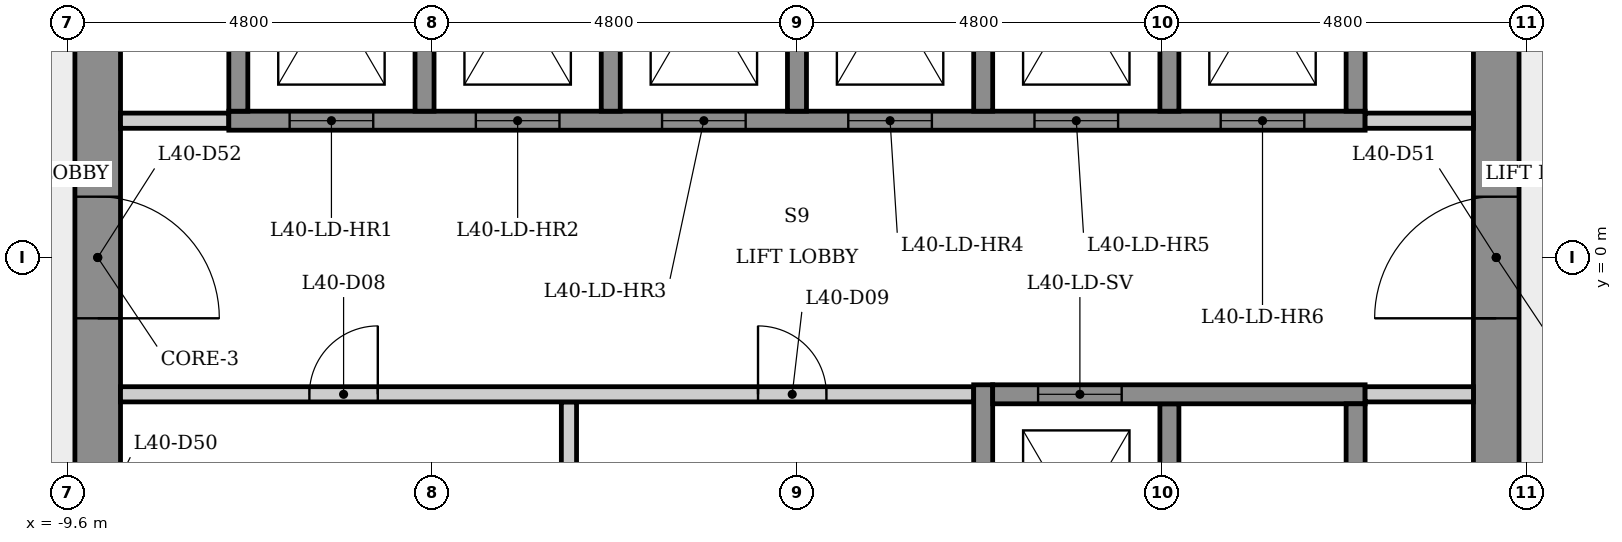
"""IFC4 building model, lengths in metres.
Left out: names, types, materials, properties, quantities, classifications, styles, units other than length and angle.
Written with IfcOpenShell. Run it as: python <this file> out.ifc"""

import sys

from ifc_helpers import new_model, si_unit, direction, frame, frame_2d, origin, place, context, subcontext, project, spatial, rectangle, extrude, element, fill, save


model = new_model("IFC4")
c1 = context("Model", 3, precision=1e-05, world=origin(), true_north=direction((0.0, 1.0)))
c2 = subcontext(c1, "Body", "Model", "MODEL_VIEW")
j1 = project(units=[si_unit("LENGTHUNIT", "METRE"), si_unit("PLANEANGLEUNIT", "RADIAN")], contexts=[c1])
p1 = place(None, origin())
s1 = spatial("IfcSite", under=j1, at=p1, CompositionType="ELEMENT")
p2 = place(p1, origin())
s2 = spatial("IfcBuilding", under=s1, at=p2, CompositionType="ELEMENT")
p3 = place(p2, frame((0.0, 0.0, 152.7)))
s3 = spatial("IfcBuildingStorey", under=s2, at=p3, CompositionType="ELEMENT", Elevation=152.7)
p4 = place(p3, frame((9.2, -5.485, 0.0), z_axis=(0.0, 0.0, 1.0), x_axis=(0.0, 1.0, 0.0)))
e1 = element("IfcWall", 1, at=p4, inside=s3, PredefinedType="SHEAR", context=c2, shape_type="SweptSolid", body=[
    extrude(rectangle(XDim=10.97, YDim=0.6, at=frame_2d((5.485, 0.0))), origin(), (0.0, 0.0, 1.0), 3.4),
])
p5 = place(p4, frame((4.685, 0.0, 0.0)))
e2 = element("IfcOpeningElement", 2, at=p5, cuts=e1, PredefinedType="OPENING", context=c2, shape_type="SweptSolid", body=[
    extrude(rectangle(XDim=1.6, YDim=2.1, at=frame_2d((0.8, 1.05))), frame((0.0, 0.31, 0.0), z_axis=(0.0, -1.0, 0.0), x_axis=(1.0, 0.0, 0.0)), (0.0, 0.0, 1.0), 0.62),
])
p6 = place(p3, frame((-9.2, 5.485, 0.0), z_axis=(0.0, 0.0, 1.0), x_axis=(0.0, -1.0, 0.0)))
e3 = element("IfcWall", 3, at=p6, inside=s3, PredefinedType="SHEAR", context=c2, shape_type="SweptSolid", body=[
    extrude(rectangle(XDim=10.97, YDim=0.6, at=frame_2d((5.485, 0.0))), origin(), (0.0, 0.0, 1.0), 3.4),
])
p7 = place(p6, frame((8.516, 0.0, 0.0)))
e4 = element("IfcOpeningElement", 4, at=p7, cuts=e3, PredefinedType="OPENING", context=c2, shape_type="SweptSolid", body=[
    extrude(rectangle(XDim=0.9, YDim=2.1, at=frame_2d((0.45, 1.05))), frame((0.0, 0.31, 0.0), z_axis=(0.0, -1.0, 0.0), x_axis=(1.0, 0.0, 0.0)), (0.0, 0.0, 1.0), 0.62),
])
p8 = place(p6, frame((4.685, 0.0, 0.0)))
e5 = element("IfcOpeningElement", 5, at=p8, cuts=e3, PredefinedType="OPENING", context=c2, shape_type="SweptSolid", body=[
    extrude(rectangle(XDim=1.6, YDim=2.1, at=frame_2d((0.8, 1.05))), frame((0.0, 0.31, 0.0), z_axis=(0.0, -1.0, 0.0), x_axis=(1.0, 0.0, 0.0)), (0.0, 0.0, 1.0), 0.62),
])
p9 = place(p3, frame((-8.9, 1.8, 0.0), z_axis=(0.0, 0.0, 1.0), x_axis=(1.0, 0.0, 0.0)))
e6 = element("IfcWall", 6, at=p9, inside=s3, PredefinedType="PARTITIONING", context=c2, shape_type="SweptSolid", body=[
    extrude(rectangle(XDim=1.425, YDim=0.2, at=frame_2d((0.712, 0.0))), origin(), (0.0, 0.0, 1.0), 3.05),
])
p10 = place(p3, frame((-7.475, 1.8, 0.0), z_axis=(0.0, 0.0, 1.0), x_axis=(1.0, 0.0, 0.0)))
e7 = element("IfcWall", 7, at=p10, inside=s3, PredefinedType="SHEAR", context=c2, shape_type="SweptSolid", body=[
    extrude(rectangle(XDim=14.95, YDim=0.25, at=frame_2d((7.475, 0.0))), origin(), (0.0, 0.0, 1.0), 3.05),
])
p11 = place(p10, frame((0.8, 0.0, 0.0)))
e8 = element("IfcOpeningElement", 8, at=p11, cuts=e7, PredefinedType="OPENING", context=c2, shape_type="SweptSolid", body=[
    extrude(rectangle(XDim=1.1, YDim=2.1, at=frame_2d((0.55, 1.05))), frame((0.0, 0.135, 0.0), z_axis=(0.0, -1.0, 0.0), x_axis=(1.0, 0.0, 0.0)), (0.0, 0.0, 1.0), 0.27),
])
p12 = place(p10, frame((3.25, 0.0, 0.0)))
e9 = element("IfcOpeningElement", 9, at=p12, cuts=e7, PredefinedType="OPENING", context=c2, shape_type="SweptSolid", body=[
    extrude(rectangle(XDim=1.1, YDim=2.1, at=frame_2d((0.55, 1.05))), frame((0.0, 0.135, 0.0), z_axis=(0.0, -1.0, 0.0), x_axis=(1.0, 0.0, 0.0)), (0.0, 0.0, 1.0), 0.27),
])
p13 = place(p10, frame((5.7, 0.0, 0.0)))
e10 = element("IfcOpeningElement", 10, at=p13, cuts=e7, PredefinedType="OPENING", context=c2, shape_type="SweptSolid", body=[
    extrude(rectangle(XDim=1.1, YDim=2.1, at=frame_2d((0.55, 1.05))), frame((0.0, 0.135, 0.0), z_axis=(0.0, -1.0, 0.0), x_axis=(1.0, 0.0, 0.0)), (0.0, 0.0, 1.0), 0.27),
])
p14 = place(p10, frame((8.15, 0.0, 0.0)))
e11 = element("IfcOpeningElement", 11, at=p14, cuts=e7, PredefinedType="OPENING", context=c2, shape_type="SweptSolid", body=[
    extrude(rectangle(XDim=1.1, YDim=2.1, at=frame_2d((0.55, 1.05))), frame((0.0, 0.135, 0.0), z_axis=(0.0, -1.0, 0.0), x_axis=(1.0, 0.0, 0.0)), (0.0, 0.0, 1.0), 0.27),
])
p15 = place(p10, frame((10.6, 0.0, 0.0)))
e12 = element("IfcOpeningElement", 12, at=p15, cuts=e7, PredefinedType="OPENING", context=c2, shape_type="SweptSolid", body=[
    extrude(rectangle(XDim=1.1, YDim=2.1, at=frame_2d((0.55, 1.05))), frame((0.0, 0.135, 0.0), z_axis=(0.0, -1.0, 0.0), x_axis=(1.0, 0.0, 0.0)), (0.0, 0.0, 1.0), 0.27),
])
p16 = place(p10, frame((13.05, 0.0, 0.0)))
e13 = element("IfcOpeningElement", 13, at=p16, cuts=e7, PredefinedType="OPENING", context=c2, shape_type="SweptSolid", body=[
    extrude(rectangle(XDim=1.1, YDim=2.1, at=frame_2d((0.55, 1.05))), frame((0.0, 0.135, 0.0), z_axis=(0.0, -1.0, 0.0), x_axis=(1.0, 0.0, 0.0)), (0.0, 0.0, 1.0), 0.27),
])
p17 = place(p3, frame((-7.35, 1.925, 0.0), z_axis=(0.0, 0.0, 1.0), x_axis=(0.0, 1.0, 0.0)))
e14 = element("IfcWall", 14, at=p17, inside=s3, PredefinedType="SHEAR", context=c2, shape_type="SweptSolid", body=[
    extrude(rectangle(XDim=4.036, YDim=0.25, at=frame_2d((2.018, 0.0))), origin(), (0.0, 0.0, 1.0), 3.05),
])
p18 = place(p3, frame((-4.9, 5.025, 0.0), z_axis=(0.0, 0.0, 1.0), x_axis=(0.0, -1.0, 0.0)))
e15 = element("IfcWall", 15, at=p18, inside=s3, PredefinedType="SHEAR", context=c2, shape_type="SweptSolid", body=[
    extrude(rectangle(XDim=3.1, YDim=0.25, at=frame_2d((1.55, 0.0))), origin(), (0.0, 0.0, 1.0), 3.4),
])
p19 = place(p3, frame((-3.0, -1.9, 0.0), z_axis=(0.0, 0.0, 1.0), x_axis=(0.0, -1.0, 0.0)))
e16 = element("IfcWall", 16, at=p19, inside=s3, PredefinedType="PARTITIONING", context=c2, shape_type="SweptSolid", body=[
    extrude(rectangle(XDim=3.15, YDim=0.2, at=frame_2d((1.575, 0.0))), origin(), (0.0, 0.0, 1.0), 3.05),
])
p20 = place(p3, frame((-8.9, -1.8, 0.0), z_axis=(0.0, 0.0, 1.0), x_axis=(1.0, 0.0, 0.0)))
e17 = element("IfcWall", 17, at=p20, inside=s3, PredefinedType="PARTITIONING", context=c2, shape_type="SweptSolid", body=[
    extrude(rectangle(XDim=11.225, YDim=0.2, at=frame_2d((5.613, 0.0))), origin(), (0.0, 0.0, 1.0), 3.05),
])
p21 = place(p20, frame((2.485, 0.0, 0.0)))
e18 = element("IfcOpeningElement", 18, at=p21, cuts=e17, PredefinedType="OPENING", context=c2, shape_type="SweptSolid", body=[
    extrude(rectangle(XDim=0.9, YDim=2.1, at=frame_2d((0.45, 1.05))), frame((0.0, 0.11, 0.0), z_axis=(0.0, -1.0, 0.0), x_axis=(1.0, 0.0, 0.0)), (0.0, 0.0, 1.0), 0.22),
])
p22 = place(p20, frame((8.387, 0.0, 0.0)))
e19 = element("IfcOpeningElement", 19, at=p22, cuts=e17, PredefinedType="OPENING", context=c2, shape_type="SweptSolid", body=[
    extrude(rectangle(XDim=0.9, YDim=2.1, at=frame_2d((0.45, 1.05))), frame((0.0, 0.11, 0.0), z_axis=(0.0, -1.0, 0.0), x_axis=(1.0, 0.0, 0.0)), (0.0, 0.0, 1.0), 0.22),
])
for number, where, z_axis, x_axis in (
    (20, (-2.45, 5.025, 0.0), (0.0, 0.0, 1.0), (0.0, -1.0, 0.0)),
    (21, (0.0, 5.025, 0.0), (0.0, 0.0, 1.0), (0.0, -1.0, 0.0)),
):
    element("IfcWall", number, at=place(p3, frame(where, z_axis=z_axis, x_axis=x_axis)), inside=s3, PredefinedType="SHEAR", context=c2, shape_type="SweptSolid", body=[
        extrude(rectangle(XDim=3.1, YDim=0.25, at=frame_2d((1.55, 0.0))), origin(), (0.0, 0.0, 1.0), 3.4),
    ])
p23 = place(p3, frame((2.45, -5.275, 0.0), z_axis=(0.0, 0.0, 1.0), x_axis=(0.0, 1.0, 0.0)))
e22 = element("IfcWall", 22, at=p23, inside=s3, PredefinedType="SHEAR", context=c2, shape_type="SweptSolid", body=[
    extrude(rectangle(XDim=3.6, YDim=0.25, at=frame_2d((1.8, 0.0))), origin(), (0.0, 0.0, 1.0), 3.05),
])
for number, where, z_axis, x_axis in (
    (23, (2.45, 5.025, 0.0), (0.0, 0.0, 1.0), (0.0, -1.0, 0.0)),
    (24, (4.9, -1.925, 0.0), (0.0, 0.0, 1.0), (0.0, -1.0, 0.0)),
    (25, (4.9, 5.025, 0.0), (0.0, 0.0, 1.0), (0.0, -1.0, 0.0)),
):
    element("IfcWall", number, at=place(p3, frame(where, z_axis=z_axis, x_axis=x_axis)), inside=s3, PredefinedType="SHEAR", context=c2, shape_type="SweptSolid", body=[
        extrude(rectangle(XDim=3.1, YDim=0.25, at=frame_2d((1.55, 0.0))), origin(), (0.0, 0.0, 1.0), 3.4),
    ])
p24 = place(p3, frame((2.575, -1.8, 0.0), z_axis=(0.0, 0.0, 1.0), x_axis=(1.0, 0.0, 0.0)))
e26 = element("IfcWall", 26, at=p24, inside=s3, PredefinedType="SHEAR", context=c2, shape_type="SweptSolid", body=[
    extrude(rectangle(XDim=4.9, YDim=0.25, at=frame_2d((2.45, 0.0))), origin(), (0.0, 0.0, 1.0), 3.05),
])
p25 = place(p24, frame((0.597, 0.0, 0.0)))
e27 = element("IfcOpeningElement", 27, at=p25, cuts=e26, PredefinedType="OPENING", context=c2, shape_type="SweptSolid", body=[
    extrude(rectangle(XDim=1.1, YDim=2.1, at=frame_2d((0.55, 1.05))), frame((0.0, 0.135, 0.0), z_axis=(0.0, -1.0, 0.0), x_axis=(1.0, 0.0, 0.0)), (0.0, 0.0, 1.0), 0.27),
])
p26 = place(p3, frame((7.475, 1.8, 0.0), z_axis=(0.0, 0.0, 1.0), x_axis=(1.0, 0.0, 0.0)))
e28 = element("IfcWall", 28, at=p26, inside=s3, PredefinedType="PARTITIONING", context=c2, shape_type="SweptSolid", body=[
    extrude(rectangle(XDim=1.425, YDim=0.2, at=frame_2d((0.712, 0.0))), origin(), (0.0, 0.0, 1.0), 3.05),
])
for number, where, z_axis, x_axis in (
    (29, (7.35, -1.925, 0.0), (0.0, 0.0, 1.0), (0.0, -1.0, 0.0)),
    (30, (7.35, 5.025, 0.0), (0.0, 0.0, 1.0), (0.0, -1.0, 0.0)),
):
    element("IfcWall", number, at=place(p3, frame(where, z_axis=z_axis, x_axis=x_axis)), inside=s3, PredefinedType="SHEAR", context=c2, shape_type="SweptSolid", body=[
        extrude(rectangle(XDim=3.1, YDim=0.25, at=frame_2d((1.55, 0.0))), origin(), (0.0, 0.0, 1.0), 3.4),
    ])
p27 = place(p3, frame((8.9, -1.8, 0.0), z_axis=(0.0, 0.0, 1.0), x_axis=(-1.0, 0.0, 0.0)))
e31 = element("IfcWall", 31, at=p27, inside=s3, PredefinedType="PARTITIONING", context=c2, shape_type="SweptSolid", body=[
    extrude(rectangle(XDim=1.425, YDim=0.2, at=frame_2d((0.712, 0.0))), origin(), (0.0, 0.0, 1.0), 3.05),
])
p28 = place(p11, origin())
e32 = element("IfcDoor", 32, at=p28, inside=s3, OperationType="SLIDING_TO_LEFT", PredefinedType="DOOR", context=c2, shape_type="SweptSolid", body=[
    extrude(rectangle(XDim=1.1, YDim=2.1, at=frame_2d((0.55, 1.05))), frame((0.0, 0.025, 0.0), z_axis=(0.0, -1.0, 0.0), x_axis=(1.0, 0.0, 0.0)), (0.0, 0.0, 1.0), 0.05),
])
fill(e8, e32)
p29 = place(p12, origin())
e33 = element("IfcDoor", 33, at=p29, inside=s3, OperationType="SLIDING_TO_LEFT", PredefinedType="DOOR", context=c2, shape_type="SweptSolid", body=[
    extrude(rectangle(XDim=1.1, YDim=2.1, at=frame_2d((0.55, 1.05))), frame((0.0, 0.025, 0.0), z_axis=(0.0, -1.0, 0.0), x_axis=(1.0, 0.0, 0.0)), (0.0, 0.0, 1.0), 0.05),
])
fill(e9, e33)
p30 = place(p13, origin())
e34 = element("IfcDoor", 34, at=p30, inside=s3, OperationType="SLIDING_TO_LEFT", PredefinedType="DOOR", context=c2, shape_type="SweptSolid", body=[
    extrude(rectangle(XDim=1.1, YDim=2.1, at=frame_2d((0.55, 1.05))), frame((0.0, 0.025, 0.0), z_axis=(0.0, -1.0, 0.0), x_axis=(1.0, 0.0, 0.0)), (0.0, 0.0, 1.0), 0.05),
])
fill(e10, e34)
p31 = place(p14, origin())
e35 = element("IfcDoor", 35, at=p31, inside=s3, OperationType="SLIDING_TO_LEFT", PredefinedType="DOOR", context=c2, shape_type="SweptSolid", body=[
    extrude(rectangle(XDim=1.1, YDim=2.1, at=frame_2d((0.55, 1.05))), frame((0.0, 0.025, 0.0), z_axis=(0.0, -1.0, 0.0), x_axis=(1.0, 0.0, 0.0)), (0.0, 0.0, 1.0), 0.05),
])
fill(e11, e35)
p32 = place(p15, origin())
e36 = element("IfcDoor", 36, at=p32, inside=s3, OperationType="SLIDING_TO_LEFT", PredefinedType="DOOR", context=c2, shape_type="SweptSolid", body=[
    extrude(rectangle(XDim=1.1, YDim=2.1, at=frame_2d((0.55, 1.05))), frame((0.0, 0.025, 0.0), z_axis=(0.0, -1.0, 0.0), x_axis=(1.0, 0.0, 0.0)), (0.0, 0.0, 1.0), 0.05),
])
fill(e12, e36)
p33 = place(p16, origin())
e37 = element("IfcDoor", 37, at=p33, inside=s3, OperationType="SLIDING_TO_LEFT", PredefinedType="DOOR", context=c2, shape_type="SweptSolid", body=[
    extrude(rectangle(XDim=1.1, YDim=2.1, at=frame_2d((0.55, 1.05))), frame((0.0, 0.025, 0.0), z_axis=(0.0, -1.0, 0.0), x_axis=(1.0, 0.0, 0.0)), (0.0, 0.0, 1.0), 0.05),
])
fill(e13, e37)
p34 = place(p25, origin())
e38 = element("IfcDoor", 38, at=p34, inside=s3, OperationType="SLIDING_TO_LEFT", PredefinedType="DOOR", context=c2, shape_type="SweptSolid", body=[
    extrude(rectangle(XDim=1.1, YDim=2.1, at=frame_2d((0.55, 1.05))), frame((0.0, 0.025, 0.0), z_axis=(0.0, -1.0, 0.0), x_axis=(1.0, 0.0, 0.0)), (0.0, 0.0, 1.0), 0.05),
])
fill(e27, e38)
p35 = place(p21, origin())
e39 = element("IfcDoor", 39, at=p35, inside=s3, OperationType="SINGLE_SWING_RIGHT", PredefinedType="DOOR", context=c2, shape_type="SweptSolid", body=[
    extrude(rectangle(XDim=0.9, YDim=2.1, at=frame_2d((0.45, 1.05))), frame((0.0, 0.025, 0.0), z_axis=(0.0, -1.0, 0.0), x_axis=(1.0, 0.0, 0.0)), (0.0, 0.0, 1.0), 0.05),
])
fill(e18, e39)
p36 = place(p22, origin())
e40 = element("IfcDoor", 40, at=p36, inside=s3, OperationType="SINGLE_SWING_LEFT", PredefinedType="DOOR", context=c2, shape_type="SweptSolid", body=[
    extrude(rectangle(XDim=0.9, YDim=2.1, at=frame_2d((0.45, 1.05))), frame((0.0, 0.025, 0.0), z_axis=(0.0, -1.0, 0.0), x_axis=(1.0, 0.0, 0.0)), (0.0, 0.0, 1.0), 0.05),
])
fill(e19, e40)
p37 = place(p5, origin())
e41 = element("IfcDoor", 41, at=p37, inside=s3, OperationType="SINGLE_SWING_LEFT", PredefinedType="DOOR", context=c2, shape_type="SweptSolid", body=[
    extrude(rectangle(XDim=1.6, YDim=2.1, at=frame_2d((0.8, 1.05))), frame((0.0, 0.025, 0.0), z_axis=(0.0, -1.0, 0.0), x_axis=(1.0, 0.0, 0.0)), (0.0, 0.0, 1.0), 0.05),
])
fill(e2, e41)
p38 = place(p8, origin())
e42 = element("IfcDoor", 42, at=p38, inside=s3, OperationType="SINGLE_SWING_RIGHT", PredefinedType="DOOR", context=c2, shape_type="SweptSolid", body=[
    extrude(rectangle(XDim=1.6, YDim=2.1, at=frame_2d((0.8, 1.05))), frame((0.0, 0.025, 0.0), z_axis=(0.0, -1.0, 0.0), x_axis=(1.0, 0.0, 0.0)), (0.0, 0.0, 1.0), 0.05),
])
fill(e5, e42)
save(model, sys.argv[1])
